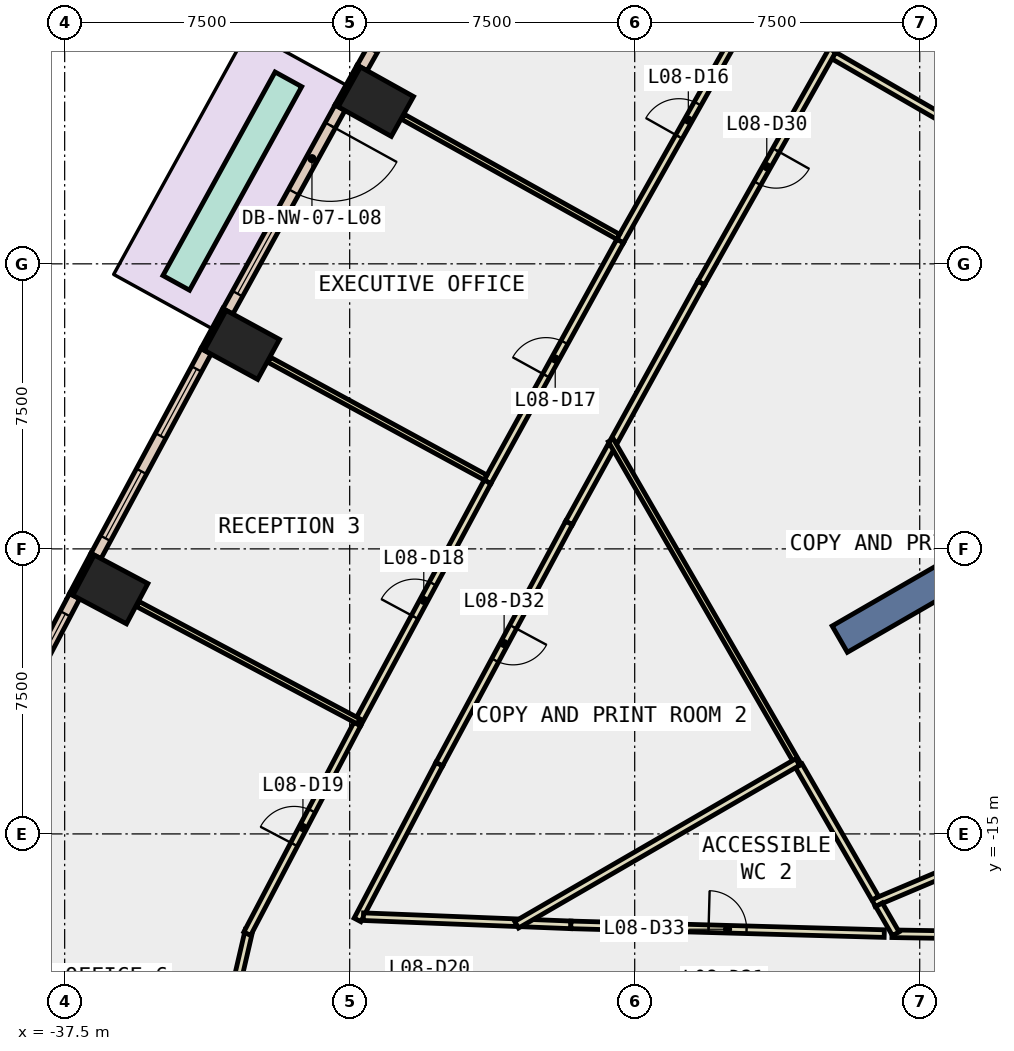
"""IFC4 building model, lengths in metres.
Left out: names, types, materials, properties, quantities, classifications, styles, units other than length and angle.
Written with IfcOpenShell. Run it as: python <this file> out.ifc"""

import sys

from ifc_helpers import new_model, si_unit, direction, frame, frame_2d, origin, origin_2d, place, context, subcontext, project, spatial, rectangle, extrude, element, fill, save


model = new_model("IFC4")
c1 = context("Model", 3, precision=1e-05, world=origin(), true_north=direction((0.0, 1.0)))
c2 = subcontext(c1, "Body", "Model", "MODEL_VIEW")
j1 = project(units=[si_unit("LENGTHUNIT", "METRE"), si_unit("PLANEANGLEUNIT", "RADIAN")], contexts=[c1])
p1 = place(None, origin())
s1 = spatial("IfcSite", under=j1, at=p1, CompositionType="ELEMENT")
p2 = place(p1, origin())
s2 = spatial("IfcBuilding", under=s1, at=p2, CompositionType="ELEMENT")
p3 = place(p2, frame((0.0, 0.0, 43.4)))
s3 = spatial("IfcBuildingStorey", under=s2, at=p3, CompositionType="ELEMENT", Elevation=43.4)
for number, where, z_axis, x_axis in (
    (1, (-29.311, 4.267, -0.4), (0.0, 0.0, 1.0), (0.487, 0.873, 0.0)),
    (2, (-32.837, -2.132, -0.4), (0.0, 0.0, 1.0), (0.478, 0.878, 0.0)),
    (3, (-36.298, -8.567, -0.4), (0.0, 0.0, 1.0), (0.469, 0.883, 0.0)),
):
    element("IfcColumn", number, at=place(p3, frame(where, z_axis=z_axis, x_axis=x_axis)), inside=s3, PredefinedType="COLUMN", context=c2, shape_type="SweptSolid", body=[
        extrude(rectangle(XDim=1.2, YDim=1.6, at=origin_2d()), origin(), (0.0, 0.0, 1.0), 4.2),
    ])
p4 = place(p3, frame((-9.31, -5.375, -0.4), z_axis=(0.0, 0.0, 1.0), x_axis=(-0.866017533419, -0.500013631625, 0.0)))
e4 = element("IfcWall", 4, at=p4, inside=s3, PredefinedType="SHEAR", context=c2, shape_type="SweptSolid", body=[
    extrude(rectangle(XDim=9.0, YDim=0.8, at=frame_2d((4.5, 0.0))), origin(), (0.0, 0.0, 1.0), 4.2),
])
p5 = place(p3, frame((-29.761, 5.205, 0.0), z_axis=(0.0, 0.0, 1.0), x_axis=(-0.486730996044, -0.87355190887, 0.0)))
e5 = element("IfcWall", 5, at=p5, inside=s3, PredefinedType="STANDARD", context=c2, shape_type="SweptSolid", body=[
    extrude(rectangle(XDim=1.2, YDim=0.1, at=frame_2d((0.6, 0.0))), origin(), (0.0, 0.0, 1.0), 3.8),
])
p6 = place(p3, frame((-33.296, -1.199, 0.0), z_axis=(0.0, 0.0, 1.0), x_axis=(-0.478424520456, -0.878128679765, 0.0)))
e6 = element("IfcWall", 6, at=p6, inside=s3, PredefinedType="STANDARD", context=c2, shape_type="SweptSolid", body=[
    extrude(rectangle(XDim=1.2, YDim=0.1, at=frame_2d((0.6, 0.0))), origin(), (0.0, 0.0, 1.0), 3.8),
])
p7 = place(p3, frame((-36.767, -7.639, 0.0), z_axis=(0.0, 0.0, 1.0), x_axis=(-0.469383408131, -0.882994459876, 0.0)))
e7 = element("IfcWall", 7, at=p7, inside=s3, PredefinedType="STANDARD", context=c2, shape_type="SweptSolid", body=[
    extrude(rectangle(XDim=1.199, YDim=0.1, at=frame_2d((0.6, 0.0))), origin(), (0.0, 0.0, 1.0), 3.8),
])
p8 = place(p3, frame((-26.667, 10.482, 0.0), z_axis=(0.0, 0.0, 1.0), x_axis=(-0.491278487323, -0.871002553322, 0.0)))
e8 = element("IfcWall", 8, at=p8, inside=s3, PredefinedType="STANDARD", context=c2, shape_type="SweptSolid", body=[
    extrude(rectangle(XDim=6.117, YDim=0.3, at=frame_2d((3.059, 0.0))), origin(), (0.0, 0.0, 1.0), 3.8),
])
p9 = place(p8, frame((0.529, 0.0, 0.9)))
e9 = element("IfcOpeningElement", 9, at=p9, cuts=e8, PredefinedType="OPENING", context=c2, shape_type="SweptSolid", body=[
    extrude(rectangle(XDim=2.0, YDim=2.6, at=frame_2d((1.0, 1.3))), frame((0.0, 0.16, 0.0), z_axis=(0.0, -1.0, 0.0), x_axis=(1.0, 0.0, 0.0)), (0.0, 0.0, 1.0), 0.32),
])
p10 = place(p8, frame((3.588, 0.0, 0.9)))
e10 = element("IfcOpeningElement", 10, at=p10, cuts=e8, PredefinedType="OPENING", context=c2, shape_type="SweptSolid", body=[
    extrude(rectangle(XDim=2.0, YDim=2.6, at=frame_2d((1.0, 1.3))), frame((0.0, 0.16, 0.0), z_axis=(0.0, -1.0, 0.0), x_axis=(1.0, 0.0, 0.0)), (0.0, 0.0, 1.0), 0.32),
])
p11 = place(p3, frame((-30.255, 4.107, 0.0), z_axis=(0.0, 0.0, 1.0), x_axis=(-0.482596003603, -0.875843078015, 0.0)))
e11 = element("IfcWall", 11, at=p11, inside=s3, PredefinedType="STANDARD", context=c2, shape_type="SweptSolid", body=[
    extrude(rectangle(XDim=6.115, YDim=0.3, at=frame_2d((3.058, 0.0))), origin(), (0.0, 0.0, 1.0), 3.8),
])
p12 = place(p11, frame((0.529, 0.0, 0.0)))
e12 = element("IfcOpeningElement", 12, at=p12, cuts=e11, PredefinedType="OPENING", context=c2, shape_type="SweptSolid", body=[
    extrude(rectangle(XDim=2.0, YDim=2.4, at=frame_2d((1.0, 1.2))), frame((0.0, 0.16, 0.0), z_axis=(0.0, -1.0, 0.0), x_axis=(1.0, 0.0, 0.0)), (0.0, 0.0, 1.0), 0.32),
])
p13 = place(p11, frame((3.586, 0.0, 0.9)))
e13 = element("IfcOpeningElement", 13, at=p13, cuts=e11, PredefinedType="OPENING", context=c2, shape_type="SweptSolid", body=[
    extrude(rectangle(XDim=2.0, YDim=2.6, at=frame_2d((1.0, 1.3))), frame((0.0, 0.16, 0.0), z_axis=(0.0, -1.0, 0.0), x_axis=(1.0, 0.0, 0.0)), (0.0, 0.0, 1.0), 0.32),
])
p14 = place(p3, frame((-33.779, -2.301, 0.0), z_axis=(0.0, 0.0, 1.0), x_axis=(-0.47375467653, -0.880656860795, 0.0)))
e14 = element("IfcWall", 14, at=p14, inside=s3, PredefinedType="STANDARD", context=c2, shape_type="SweptSolid", body=[
    extrude(rectangle(XDim=6.117, YDim=0.3, at=frame_2d((3.059, 0.0))), origin(), (0.0, 0.0, 1.0), 3.8),
])
p15 = place(p14, frame((0.529, 0.0, 0.9)))
e15 = element("IfcOpeningElement", 15, at=p15, cuts=e14, PredefinedType="OPENING", context=c2, shape_type="SweptSolid", body=[
    extrude(rectangle(XDim=2.0, YDim=2.6, at=frame_2d((1.0, 1.3))), frame((0.0, 0.16, 0.0), z_axis=(0.0, -1.0, 0.0), x_axis=(1.0, 0.0, 0.0)), (0.0, 0.0, 1.0), 0.32),
])
p16 = place(p14, frame((3.588, 0.0, 0.9)))
e16 = element("IfcOpeningElement", 16, at=p16, cuts=e14, PredefinedType="OPENING", context=c2, shape_type="SweptSolid", body=[
    extrude(rectangle(XDim=2.0, YDim=2.6, at=frame_2d((1.0, 1.3))), frame((0.0, 0.16, 0.0), z_axis=(0.0, -1.0, 0.0), x_axis=(1.0, 0.0, 0.0)), (0.0, 0.0, 1.0), 0.32),
])
p17 = place(p3, frame((-37.239, -8.746, 0.0), z_axis=(0.0, 0.0, 1.0), x_axis=(-0.464913987781, -0.885355851602, 0.0)))
e17 = element("IfcWall", 17, at=p17, inside=s3, PredefinedType="STANDARD", context=c2, shape_type="SweptSolid", body=[
    extrude(rectangle(XDim=6.094, YDim=0.3, at=frame_2d((3.047, 0.0))), origin(), (0.0, 0.0, 1.0), 3.8),
])
p18 = place(p17, frame((0.523, 0.0, 0.9)))
e18 = element("IfcOpeningElement", 18, at=p18, cuts=e17, PredefinedType="OPENING", context=c2, shape_type="SweptSolid", body=[
    extrude(rectangle(XDim=2.0, YDim=2.6, at=frame_2d((1.0, 1.3))), frame((0.0, 0.16, 0.0), z_axis=(0.0, -1.0, 0.0), x_axis=(1.0, 0.0, 0.0)), (0.0, 0.0, 1.0), 0.32),
])
p19 = place(p17, frame((3.57, 0.0, 0.9)))
e19 = element("IfcOpeningElement", 19, at=p19, cuts=e17, PredefinedType="OPENING", context=c2, shape_type="SweptSolid", body=[
    extrude(rectangle(XDim=2.0, YDim=2.6, at=frame_2d((1.0, 1.3))), frame((0.0, 0.16, 0.0), z_axis=(0.0, -1.0, 0.0), x_axis=(1.0, 0.0, 0.0)), (0.0, 0.0, 1.0), 0.32),
])
p20 = place(p3, frame((-31.613, 4.855, 0.0), z_axis=(0.0, 0.0, 1.0), x_axis=(-0.482565377311, -0.87585995263, 0.0)))
e20 = element("IfcWall", 20, at=p20, inside=s3, PredefinedType="STANDARD", context=c2, shape_type="SweptSolid", body=[
    extrude(rectangle(XDim=6.115, YDim=0.8, at=frame_2d((3.058, 0.0))), origin(), (0.0, 0.0, 1.0), 0.8),
])
p21 = place(p3, frame((-17.261, 5.48, 0.0), z_axis=(0.0, 0.0, 1.0), x_axis=(0.865949187497, -0.500131987253, 0.0)))
e21 = element("IfcWall", 21, at=p21, inside=s3, PredefinedType="PARTITIONING", context=c2, shape_type="SweptSolid", body=[
    extrude(rectangle(XDim=3.939, YDim=0.2, at=frame_2d((1.969, 0.0))), origin(), (0.0, 0.0, 1.0), 3.8),
])
p22 = place(p3, frame((-17.299, 5.617, 0.0), z_axis=(0.0, 0.0, 1.0), x_axis=(-0.491166441632, -0.871065741844, 0.0)))
e22 = element("IfcWall", 22, at=p22, inside=s3, PredefinedType="PARTITIONING", context=c2, shape_type="SweptSolid", body=[
    extrude(rectangle(XDim=7.028, YDim=0.2, at=frame_2d((3.514, 0.0))), origin(), (0.0, 0.0, 1.0), 3.8),
])
p23 = place(p22, frame((3.014, 0.0, 0.0)))
e23 = element("IfcOpeningElement", 23, at=p23, cuts=e22, PredefinedType="OPENING", context=c2, shape_type="SweptSolid", body=[
    extrude(rectangle(XDim=1.0, YDim=2.1, at=frame_2d((0.5, 1.05))), frame((0.0, 0.11, 0.0), z_axis=(0.0, -1.0, 0.0), x_axis=(1.0, 0.0, 0.0)), (0.0, 0.0, 1.0), 0.22),
])
p24 = place(p3, frame((-20.751, -0.505, 0.0), z_axis=(0.0, 0.0, 1.0), x_axis=(-0.482566110981, -0.875859548405, 0.0)))
e24 = element("IfcWall", 24, at=p24, inside=s3, PredefinedType="PARTITIONING", context=c2, shape_type="SweptSolid", body=[
    extrude(rectangle(XDim=4.748, YDim=0.2, at=frame_2d((2.374, 0.0))), origin(), (0.0, 0.0, 1.0), 3.8),
])
p25 = place(p3, frame((-15.73, -17.627, 0.0), z_axis=(0.0, 0.0, 1.0), x_axis=(0.999866746812, -0.016324479129, 0.0)))
e25 = element("IfcWall", 25, at=p25, inside=s3, PredefinedType="PARTITIONING", context=c2, shape_type="SweptSolid", body=[
    extrude(rectangle(XDim=8.031, YDim=0.2, at=frame_2d((4.016, 0.0))), origin(), (0.0, 0.0, 1.0), 3.8),
])
p26 = place(p25, frame((3.515, 0.0, 0.0)))
e26 = element("IfcOpeningElement", 26, at=p26, cuts=e25, PredefinedType="OPENING", context=c2, shape_type="SweptSolid", body=[
    extrude(rectangle(XDim=1.0, YDim=2.1, at=frame_2d((0.5, 1.05))), frame((0.0, 0.11, 0.0), z_axis=(0.0, -1.0, 0.0), x_axis=(1.0, 0.0, 0.0)), (0.0, 0.0, 1.0), 0.22),
])
p27 = place(p3, frame((-23.114, -4.794, 0.0), z_axis=(0.0, 0.0, 1.0), x_axis=(-0.482482362329, -0.875905685586, 0.0)))
e27 = element("IfcWall", 27, at=p27, inside=s3, PredefinedType="PARTITIONING", context=c2, shape_type="SweptSolid", body=[
    extrude(rectangle(XDim=2.311, YDim=0.2, at=frame_2d((1.156, 0.0))), origin(), (0.0, 0.0, 1.0), 3.8),
])
p28 = place(p3, frame((-24.229, -6.818, 0.0), z_axis=(0.0, 0.0, 1.0), x_axis=(-0.473714049803, -0.88067871498, 0.0)))
e28 = element("IfcWall", 28, at=p28, inside=s3, PredefinedType="PARTITIONING", context=c2, shape_type="SweptSolid", body=[
    extrude(rectangle(XDim=7.209, YDim=0.2, at=frame_2d((3.604, 0.0))), origin(), (0.0, 0.0, 1.0), 3.8),
])
p29 = place(p28, frame((3.104, 0.0, 0.0)))
e29 = element("IfcOpeningElement", 29, at=p29, cuts=e28, PredefinedType="OPENING", context=c2, shape_type="SweptSolid", body=[
    extrude(rectangle(XDim=1.0, YDim=2.1, at=frame_2d((0.5, 1.05))), frame((0.0, 0.11, 0.0), z_axis=(0.0, -1.0, 0.0), x_axis=(1.0, 0.0, 0.0)), (0.0, 0.0, 1.0), 0.22),
])
p30 = place(p3, frame((-27.644, -13.167, 0.0), z_axis=(0.0, 0.0, 1.0), x_axis=(-0.464919738277, -0.885352831904, 0.0)))
e30 = element("IfcWall", 30, at=p30, inside=s3, PredefinedType="PARTITIONING", context=c2, shape_type="SweptSolid", body=[
    extrude(rectangle(XDim=4.626, YDim=0.2, at=frame_2d((2.313, 0.0))), origin(), (0.0, 0.0, 1.0), 3.8),
])
p31 = place(p3, frame((-29.639, -17.178, 0.0), z_axis=(0.0, 0.0, 1.0), x_axis=(0.999228076722, -0.039284229546, 0.0)))
e31 = element("IfcWall", 31, at=p31, inside=s3, PredefinedType="PARTITIONING", context=c2, shape_type="SweptSolid", body=[
    extrude(rectangle(XDim=4.021, YDim=0.2, at=frame_2d((2.01, 0.0))), origin(), (0.0, 0.0, 1.0), 3.8),
])
p32 = place(p3, frame((-25.421, -17.344, 0.0), z_axis=(0.0, 0.0, 1.0), x_axis=(0.999219068508, -0.039512695804, 0.0)))
e32 = element("IfcWall", 32, at=p32, inside=s3, PredefinedType="PARTITIONING", context=c2, shape_type="SweptSolid", body=[
    extrude(rectangle(XDim=1.242, YDim=0.2, at=frame_2d((0.621, 0.0))), origin(), (0.0, 0.0, 1.0), 3.8),
])
p33 = place(p3, frame((-24.18, -17.393, 0.0), z_axis=(0.0, 0.0, 1.0), x_axis=(0.999611380121, -0.02787631132, 0.0)))
e33 = element("IfcWall", 33, at=p33, inside=s3, PredefinedType="PARTITIONING", context=c2, shape_type="SweptSolid", body=[
    extrude(rectangle(XDim=8.25, YDim=0.2, at=frame_2d((4.125, 0.0))), origin(), (0.0, 0.0, 1.0), 3.8),
])
p34 = place(p33, frame((3.625, 0.0, 0.0)))
e34 = element("IfcOpeningElement", 34, at=p34, cuts=e33, PredefinedType="OPENING", context=c2, shape_type="SweptSolid", body=[
    extrude(rectangle(XDim=1.0, YDim=2.1, at=frame_2d((0.5, 1.05))), frame((0.0, 0.11, 0.0), z_axis=(0.0, -1.0, 0.0), x_axis=(1.0, 0.0, 0.0)), (0.0, 0.0, 1.0), 0.22),
])
p35 = place(p3, frame((-22.884, 0.598, 0.0), z_axis=(0.0, 0.0, 1.0), x_axis=(0.491206176175, 0.871043335597, 0.0)))
e35 = element("IfcWall", 35, at=p35, inside=s3, PredefinedType="PARTITIONING", context=c2, shape_type="SweptSolid", body=[
    extrude(rectangle(XDim=7.309, YDim=0.2, at=frame_2d((3.654, 0.0))), origin(), (0.0, 0.0, 1.0), 3.8),
])
p36 = place(p35, frame((3.154, 0.0, 0.0)))
e36 = element("IfcOpeningElement", 36, at=p36, cuts=e35, PredefinedType="OPENING", context=c2, shape_type="SweptSolid", body=[
    extrude(rectangle(XDim=1.0, YDim=2.1, at=frame_2d((0.5, 1.05))), frame((0.0, 0.11, 0.0), z_axis=(0.0, -1.0, 0.0), x_axis=(1.0, 0.0, 0.0)), (0.0, 0.0, 1.0), 0.22),
])
p37 = place(p3, frame((-26.373, -5.736, 0.0), z_axis=(0.0, 0.0, 1.0), x_axis=(0.482587313112, 0.875847866483, 0.0)))
e37 = element("IfcWall", 37, at=p37, inside=s3, PredefinedType="PARTITIONING", context=c2, shape_type="SweptSolid", body=[
    extrude(rectangle(XDim=7.232, YDim=0.2, at=frame_2d((3.616, 0.0))), origin(), (0.0, 0.0, 1.0), 3.8),
])
p38 = place(p37, frame((3.191, 0.0, 0.0)))
e38 = element("IfcOpeningElement", 38, at=p38, cuts=e37, PredefinedType="OPENING", context=c2, shape_type="SweptSolid", body=[
    extrude(rectangle(XDim=1.0, YDim=2.1, at=frame_2d((0.5, 1.05))), frame((0.0, 0.11, 0.0), z_axis=(0.0, -1.0, 0.0), x_axis=(1.0, 0.0, 0.0)), (0.0, 0.0, 1.0), 0.22),
])
p39 = place(p3, frame((-29.799, -12.106, 0.0), z_axis=(0.0, 0.0, 1.0), x_axis=(0.473681086062, 0.880696445268, 0.0)))
e39 = element("IfcWall", 39, at=p39, inside=s3, PredefinedType="PARTITIONING", context=c2, shape_type="SweptSolid", body=[
    extrude(rectangle(XDim=7.233, YDim=0.2, at=frame_2d((3.616, 0.0))), origin(), (0.0, 0.0, 1.0), 3.8),
])
p40 = place(p39, frame((3.191, 0.0, 0.0)))
e40 = element("IfcOpeningElement", 40, at=p40, cuts=e39, PredefinedType="OPENING", context=c2, shape_type="SweptSolid", body=[
    extrude(rectangle(XDim=1.0, YDim=2.1, at=frame_2d((0.5, 1.05))), frame((0.0, 0.11, 0.0), z_axis=(0.0, -1.0, 0.0), x_axis=(1.0, 0.0, 0.0)), (0.0, 0.0, 1.0), 0.22),
])
p41 = place(p3, frame((-32.96, -18.874, 0.0), z_axis=(0.0, 0.0, 1.0), x_axis=(0.226081445763, 0.974108402531, 0.0)))
e41 = element("IfcWall", 41, at=p41, inside=s3, PredefinedType="PARTITIONING", context=c2, shape_type="SweptSolid", body=[
    extrude(rectangle(XDim=1.371, YDim=0.2, at=frame_2d((0.686, 0.0))), origin(), (0.0, 0.0, 1.0), 3.8),
])
p42 = place(p3, frame((-32.696, -17.626, 0.0), z_axis=(0.0, 0.0, 1.0), x_axis=(0.464767882002, 0.885432558617, 0.0)))
e42 = element("IfcWall", 42, at=p42, inside=s3, PredefinedType="PARTITIONING", context=c2, shape_type="SweptSolid", body=[
    extrude(rectangle(XDim=6.233, YDim=0.2, at=frame_2d((3.117, 0.0))), origin(), (0.0, 0.0, 1.0), 3.8),
])
p43 = place(p42, frame((2.654, 0.0, 0.0)))
e43 = element("IfcOpeningElement", 43, at=p43, cuts=e42, PredefinedType="OPENING", context=c2, shape_type="SweptSolid", body=[
    extrude(rectangle(XDim=1.0, YDim=2.1, at=frame_2d((0.5, 1.05))), frame((0.0, 0.11, 0.0), z_axis=(0.0, -1.0, 0.0), x_axis=(1.0, 0.0, 0.0)), (0.0, 0.0, 1.0), 0.22),
])
p44 = place(p3, frame((-7.708, -13.222, 0.0), z_axis=(0.0, 0.0, 1.0), x_axis=(-0.921093468555, -0.389341523839, 0.0)))
e44 = element("IfcWall", 44, at=p44, inside=s3, PredefinedType="PARTITIONING", context=c2, shape_type="SweptSolid", body=[
    extrude(rectangle(XDim=9.233, YDim=0.2, at=frame_2d((4.617, 0.0))), origin(), (0.0, 0.0, 1.0), 3.8),
])
p45 = place(p3, frame((-18.182, -13.207, 0.0), z_axis=(0.0, 0.0, 1.0), x_axis=(-0.500081416649, 0.865978392757, 0.0)))
e45 = element("IfcWall", 45, at=p45, inside=s3, PredefinedType="PARTITIONING", context=c2, shape_type="SweptSolid", body=[
    extrude(rectangle(XDim=9.89, YDim=0.15, at=frame_2d((4.945, 0.0))), origin(), (0.0, 0.0, 1.0), 3.8),
])
p46 = place(p3, frame((-16.171, -16.692, 0.0), z_axis=(0.0, 0.0, 1.0), x_axis=(-0.499813503007, 0.866133051102, 0.0)))
e46 = element("IfcWall", 46, at=p46, inside=s3, PredefinedType="PARTITIONING", context=c2, shape_type="SweptSolid", body=[
    extrude(rectangle(XDim=4.023, YDim=0.2, at=frame_2d((2.012, 0.0))), origin(), (0.0, 0.0, 1.0), 3.8),
])
p47 = place(p3, frame((-15.63, -17.628, 0.0), z_axis=(0.0, 0.0, 1.0), x_axis=(-0.500577563191, 0.865691690632, 0.0)))
e47 = element("IfcWall", 47, at=p47, inside=s3, PredefinedType="PARTITIONING", context=c2, shape_type="SweptSolid", body=[
    extrude(rectangle(XDim=0.881, YDim=0.2, at=frame_2d((0.441, 0.0))), origin(), (0.0, 0.0, 1.0), 3.8),
])
p48 = place(p3, frame((-18.211, -13.108, 0.0), z_axis=(0.0, 0.0, 1.0), x_axis=(-0.865421721769, -0.501044153235, 0.0)))
e48 = element("IfcWall", 48, at=p48, inside=s3, PredefinedType="PARTITIONING", context=c2, shape_type="SweptSolid", body=[
    extrude(rectangle(XDim=8.546, YDim=0.2, at=frame_2d((4.273, 0.0))), origin(), (0.0, 0.0, 1.0), 3.8),
])
p49 = place(p3, frame((-22.935, 0.712, 0.0), z_axis=(0.0, 0.0, 1.0), x_axis=(-0.873395616379, 0.487011393389, 0.0)))
e49 = element("IfcWall", 49, at=p49, inside=s3, PredefinedType="PARTITIONING", context=c2, shape_type="SweptSolid", body=[
    extrude(rectangle(XDim=6.48, YDim=0.15, at=frame_2d((3.24, 0.0))), origin(), (0.0, 0.0, 1.0), 3.8),
])
p50 = place(p3, frame((-26.425, -5.623, 0.0), z_axis=(0.0, 0.0, 1.0), x_axis=(-0.87825523631, 0.478192157919, 0.0)))
e50 = element("IfcWall", 50, at=p50, inside=s3, PredefinedType="PARTITIONING", context=c2, shape_type="SweptSolid", body=[
    extrude(rectangle(XDim=6.481, YDim=0.15, at=frame_2d((3.24, 0.0))), origin(), (0.0, 0.0, 1.0), 3.8),
])
p51 = place(p3, frame((-29.764, -12.04, 0.0), z_axis=(0.0, 0.0, 1.0), x_axis=(-0.883018657393, 0.469337885426, 0.0)))
e51 = element("IfcWall", 51, at=p51, inside=s3, PredefinedType="PARTITIONING", context=c2, shape_type="SweptSolid", body=[
    extrude(rectangle(XDim=6.58, YDim=0.15, at=frame_2d((3.29, 0.0))), origin(), (0.0, 0.0, 1.0), 3.8),
])
p52 = place(p12, origin())
e52 = element("IfcDoor", 52, at=p52, inside=s3, OperationType="SLIDING_TO_LEFT", PredefinedType="DOOR", context=c2, shape_type="SweptSolid", body=[
    extrude(rectangle(XDim=2.0, YDim=2.4, at=frame_2d((1.0, 1.2))), frame((0.0, 0.025, 0.0), z_axis=(0.0, -1.0, 0.0), x_axis=(1.0, 0.0, 0.0)), (0.0, 0.0, 1.0), 0.05),
])
fill(e12, e52)
p53 = place(p13, origin())
e53 = element("IfcWindow", 53, at=p53, inside=s3, PartitioningType="SINGLE_PANEL", PredefinedType="WINDOW", context=c2, shape_type="SweptSolid", body=[
    extrude(rectangle(XDim=2.0, YDim=2.6, at=frame_2d((1.0, 1.3))), frame((0.0, 0.03, 0.0), z_axis=(0.0, -1.0, 0.0), x_axis=(1.0, 0.0, 0.0)), (0.0, 0.0, 1.0), 0.06),
])
fill(e13, e53)
p54 = place(p15, origin())
e54 = element("IfcWindow", 54, at=p54, inside=s3, PartitioningType="SINGLE_PANEL", PredefinedType="WINDOW", context=c2, shape_type="SweptSolid", body=[
    extrude(rectangle(XDim=2.0, YDim=2.6, at=frame_2d((1.0, 1.3))), frame((0.0, 0.03, 0.0), z_axis=(0.0, -1.0, 0.0), x_axis=(1.0, 0.0, 0.0)), (0.0, 0.0, 1.0), 0.06),
])
fill(e15, e54)
p55 = place(p16, origin())
e55 = element("IfcWindow", 55, at=p55, inside=s3, PartitioningType="SINGLE_PANEL", PredefinedType="WINDOW", context=c2, shape_type="SweptSolid", body=[
    extrude(rectangle(XDim=2.0, YDim=2.6, at=frame_2d((1.0, 1.3))), frame((0.0, 0.03, 0.0), z_axis=(0.0, -1.0, 0.0), x_axis=(1.0, 0.0, 0.0)), (0.0, 0.0, 1.0), 0.06),
])
fill(e16, e55)
p56 = place(p18, origin())
e56 = element("IfcWindow", 56, at=p56, inside=s3, PartitioningType="SINGLE_PANEL", PredefinedType="WINDOW", context=c2, shape_type="SweptSolid", body=[
    extrude(rectangle(XDim=2.0, YDim=2.6, at=frame_2d((1.0, 1.3))), frame((0.0, 0.03, 0.0), z_axis=(0.0, -1.0, 0.0), x_axis=(1.0, 0.0, 0.0)), (0.0, 0.0, 1.0), 0.06),
])
fill(e18, e56)
p57 = place(p36, origin())
e57 = element("IfcDoor", 57, at=p57, inside=s3, OperationType="SINGLE_SWING_RIGHT", PredefinedType="DOOR", context=c2, shape_type="SweptSolid", body=[
    extrude(rectangle(XDim=1.0, YDim=2.1, at=frame_2d((0.5, 1.05))), frame((0.0, 0.025, 0.0), z_axis=(0.0, -1.0, 0.0), x_axis=(1.0, 0.0, 0.0)), (0.0, 0.0, 1.0), 0.05),
])
fill(e36, e57)
p58 = place(p38, origin())
e58 = element("IfcDoor", 58, at=p58, inside=s3, OperationType="SINGLE_SWING_LEFT", PredefinedType="DOOR", context=c2, shape_type="SweptSolid", body=[
    extrude(rectangle(XDim=1.0, YDim=2.1, at=frame_2d((0.5, 1.05))), frame((0.0, 0.025, 0.0), z_axis=(0.0, -1.0, 0.0), x_axis=(1.0, 0.0, 0.0)), (0.0, 0.0, 1.0), 0.05),
])
fill(e38, e58)
p59 = place(p40, origin())
e59 = element("IfcDoor", 59, at=p59, inside=s3, OperationType="SINGLE_SWING_RIGHT", PredefinedType="DOOR", context=c2, shape_type="SweptSolid", body=[
    extrude(rectangle(XDim=1.0, YDim=2.1, at=frame_2d((0.5, 1.05))), frame((0.0, 0.025, 0.0), z_axis=(0.0, -1.0, 0.0), x_axis=(1.0, 0.0, 0.0)), (0.0, 0.0, 1.0), 0.05),
])
fill(e40, e59)
p60 = place(p43, origin())
e60 = element("IfcDoor", 60, at=p60, inside=s3, OperationType="SINGLE_SWING_RIGHT", PredefinedType="DOOR", context=c2, shape_type="SweptSolid", body=[
    extrude(rectangle(XDim=1.0, YDim=2.1, at=frame_2d((0.5, 1.05))), frame((0.0, 0.025, 0.0), z_axis=(0.0, -1.0, 0.0), x_axis=(1.0, 0.0, 0.0)), (0.0, 0.0, 1.0), 0.05),
])
fill(e43, e60)
p61 = place(p23, origin())
e61 = element("IfcDoor", 61, at=p61, inside=s3, OperationType="SINGLE_SWING_RIGHT", PredefinedType="DOOR", context=c2, shape_type="SweptSolid", body=[
    extrude(rectangle(XDim=1.0, YDim=2.1, at=frame_2d((0.5, 1.05))), frame((0.0, 0.025, 0.0), z_axis=(0.0, -1.0, 0.0), x_axis=(1.0, 0.0, 0.0)), (0.0, 0.0, 1.0), 0.05),
])
fill(e23, e61)
p62 = place(p29, origin())
e62 = element("IfcDoor", 62, at=p62, inside=s3, OperationType="SINGLE_SWING_RIGHT", PredefinedType="DOOR", context=c2, shape_type="SweptSolid", body=[
    extrude(rectangle(XDim=1.0, YDim=2.1, at=frame_2d((0.5, 1.05))), frame((0.0, 0.025, 0.0), z_axis=(0.0, -1.0, 0.0), x_axis=(1.0, 0.0, 0.0)), (0.0, 0.0, 1.0), 0.05),
])
fill(e29, e62)
p63 = place(p34, origin())
e63 = element("IfcDoor", 63, at=p63, inside=s3, OperationType="SINGLE_SWING_RIGHT", PredefinedType="DOOR", context=c2, shape_type="SweptSolid", body=[
    extrude(rectangle(XDim=1.0, YDim=2.1, at=frame_2d((0.5, 1.05))), frame((0.0, 0.025, 0.0), z_axis=(0.0, -1.0, 0.0), x_axis=(1.0, 0.0, 0.0)), (0.0, 0.0, 1.0), 0.05),
])
fill(e34, e63)
save(model, sys.argv[1])
